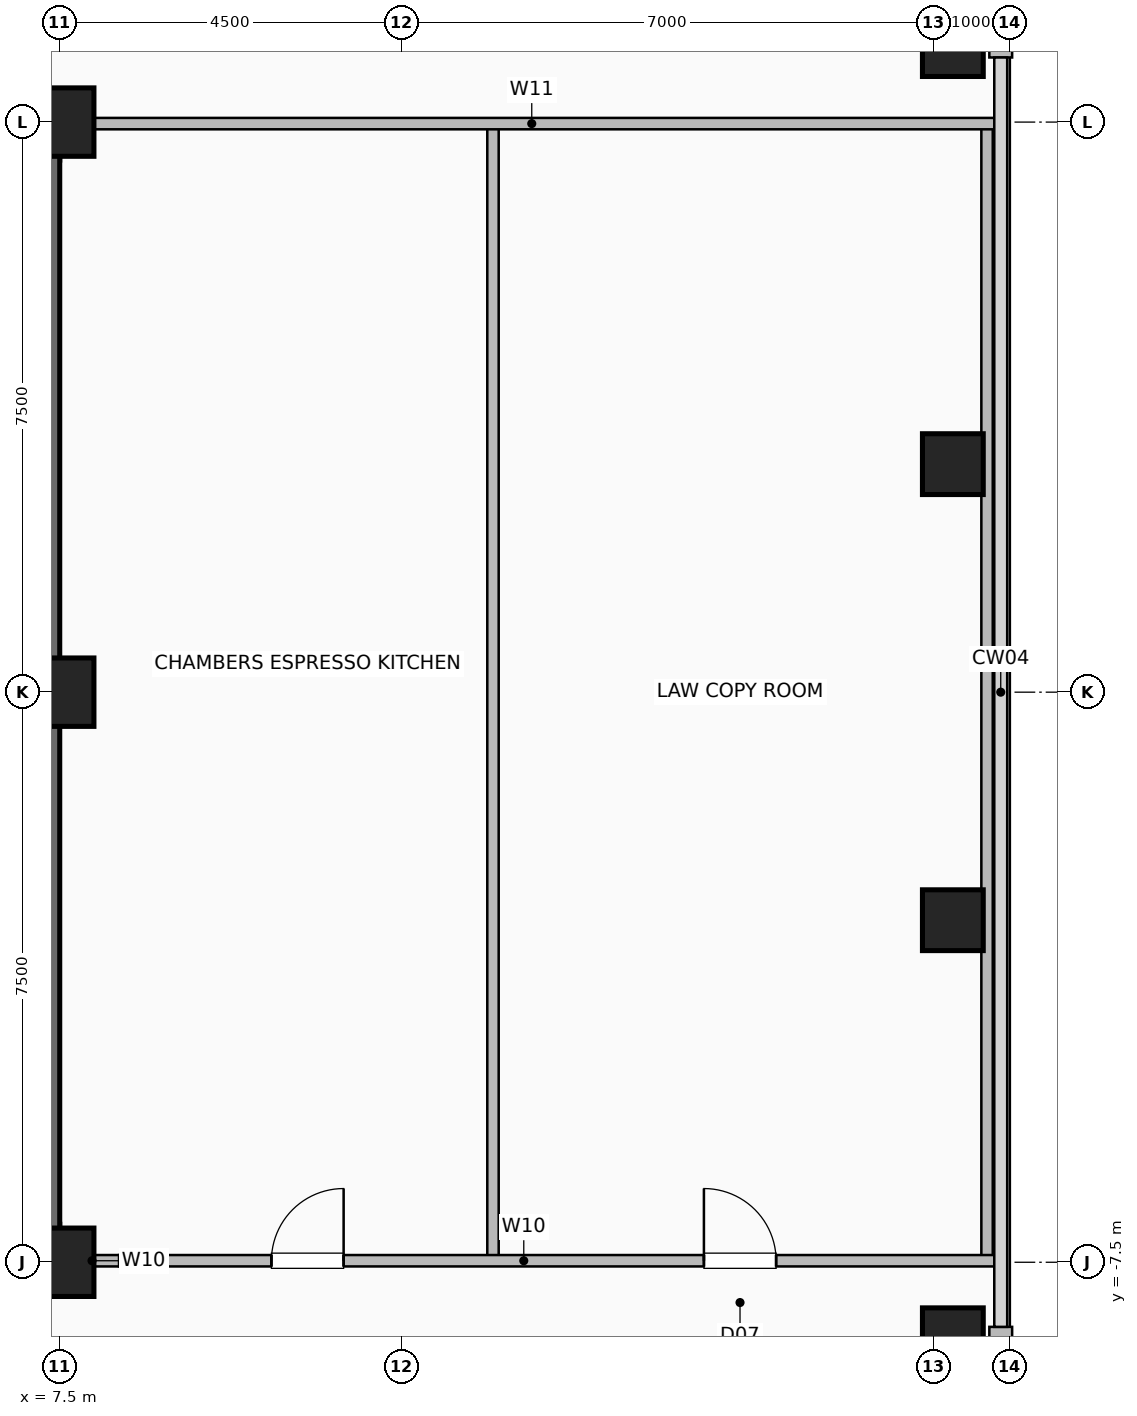
"""IFC4 building model, lengths in metres.
Left out: names, types, materials, properties, quantities, classifications, styles, units other than length and angle.
Written with IfcOpenShell. Run it as: python <this file> out.ifc"""

import sys

from ifc_helpers import new_model, si_unit, direction, frame, frame_2d, origin, origin_2d, place, context, subcontext, project, spatial, rectangle, hollow_rectangle, extrude, element, fill, save


model = new_model("IFC4")
c1 = context("Model", 3, precision=1e-05, world=origin(), true_north=direction((0.0, 1.0)))
c2 = subcontext(c1, "Body", "Model", "MODEL_VIEW")
j1 = project(units=[si_unit("LENGTHUNIT", "METRE"), si_unit("PLANEANGLEUNIT", "RADIAN")], contexts=[c1])
p1 = place(None, origin())
s1 = spatial("IfcSite", under=j1, at=p1, CompositionType="ELEMENT")
p2 = place(p1, origin())
s2 = spatial("IfcBuilding", under=s1, at=p2, CompositionType="ELEMENT")
p3 = place(p2, frame((0.0, 0.0, 169.8)))
s3 = spatial("IfcBuildingStorey", under=s2, at=p3, CompositionType="ELEMENT", Elevation=169.8)
for number, where, z_axis, x_axis in (
    (1, (7.5, -7.5, 0.0), (0.0, 0.0, 1.0), (1.0, 0.0, 0.0)),
    (2, (7.5, 0.0, 0.0), (0.0, 0.0, 1.0), (1.0, 0.0, 0.0)),
    (3, (7.5, 7.5, 0.0), (0.0, 0.0, 1.0), (1.0, 0.0, 0.0)),
):
    element("IfcColumn", number, at=place(p3, frame(where, z_axis=z_axis, x_axis=x_axis)), inside=s3, PredefinedType="COLUMN", context=c2, shape_type="SweptSolid", body=[
        extrude(hollow_rectangle(XDim=0.9, YDim=0.9, WallThickness=0.045, at=origin_2d()), origin(), (0.0, 0.0, 1.0), 3.6),
    ])
for number, where, z_axis, x_axis in (
    (4, (19.25, -8.5, 0.0), (0.0, 0.0, 1.0), (1.0, 0.0, 0.0)),
    (5, (19.25, -3.0, 0.0), (0.0, 0.0, 1.0), (1.0, 0.0, 0.0)),
    (6, (19.25, 3.0, 0.0), (0.0, 0.0, 1.0), (1.0, 0.0, 0.0)),
    (7, (19.25, 8.5, 0.0), (0.0, 0.0, 1.0), (1.0, 0.0, 0.0)),
):
    element("IfcColumn", number, at=place(p3, frame(where, z_axis=z_axis, x_axis=x_axis)), inside=s3, PredefinedType="COLUMN", context=c2, shape_type="SweptSolid", body=[
        extrude(hollow_rectangle(XDim=0.8, YDim=0.8, WallThickness=0.04, at=origin_2d()), origin(), (0.0, 0.0, 1.0), 3.6),
    ])
for number, where, z_axis, x_axis in (
    (8, (19.88, -13.15, 0.0), (0.0, 0.0, 1.0), (0.0, 1.0, 0.0)),
    (9, (19.88, 8.35, 0.0), (0.0, 0.0, 1.0), (0.0, 1.0, 0.0)),
):
    element("IfcWall", number, at=place(p3, frame(where, z_axis=z_axis, x_axis=x_axis)), inside=s3, PredefinedType="SOLIDWALL", context=c2, shape_type="SweptSolid", body=[
        extrude(rectangle(XDim=4.8, YDim=0.3, at=frame_2d((2.4, 0.0))), origin(), (0.0, 0.0, 1.0), 3.36),
    ])
p4 = place(p3, frame((-7.5, -7.25, 0.0), z_axis=(0.0, 0.0, 1.0), x_axis=(1.0, 0.0, 0.0)))
e10 = element("IfcWall", 10, at=p4, inside=s3, PredefinedType="SHEAR", context=c2, shape_type="SweptSolid", body=[
    extrude(rectangle(XDim=15.0, YDim=0.5, at=frame_2d((7.5, 0.0))), origin(), (0.0, 0.0, 1.0), 3.36),
])
p5 = place(p4, frame((1.55, 0.0, 0.0)))
e11 = element("IfcOpeningElement", 11, at=p5, cuts=e10, PredefinedType="OPENING", context=c2, shape_type="SweptSolid", body=[
    extrude(rectangle(XDim=1.05, YDim=2.08, at=frame_2d((0.525, 1.04))), frame((0.0, 0.26, 0.0), z_axis=(0.0, -1.0, 0.0), x_axis=(1.0, 0.0, 0.0)), (0.0, 0.0, 1.0), 0.52),
])
p6 = place(p4, frame((12.4, 0.0, 0.0)))
e12 = element("IfcOpeningElement", 12, at=p6, cuts=e10, PredefinedType="OPENING", context=c2, shape_type="SweptSolid", body=[
    extrude(rectangle(XDim=1.05, YDim=2.08, at=frame_2d((0.525, 1.04))), frame((0.0, 0.26, 0.0), z_axis=(0.0, -1.0, 0.0), x_axis=(1.0, 0.0, 0.0)), (0.0, 0.0, 1.0), 0.52),
])
p7 = place(p4, frame((5.2, 0.0, 0.0)))
e13 = element("IfcOpeningElement", 13, at=p7, cuts=e10, PredefinedType="OPENING", context=c2, shape_type="SweptSolid", body=[
    extrude(rectangle(XDim=1.0, YDim=2.08, at=frame_2d((0.5, 1.04))), frame((0.0, 0.26, 0.0), z_axis=(0.0, -1.0, 0.0), x_axis=(1.0, 0.0, 0.0)), (0.0, 0.0, 1.0), 0.52),
])
p8 = place(p4, frame((8.65, 0.0, 0.0)))
e14 = element("IfcOpeningElement", 14, at=p8, cuts=e10, PredefinedType="OPENING", context=c2, shape_type="SweptSolid", body=[
    extrude(rectangle(XDim=1.0, YDim=2.08, at=frame_2d((0.5, 1.04))), frame((0.0, 0.26, 0.0), z_axis=(0.0, -1.0, 0.0), x_axis=(1.0, 0.0, 0.0)), (0.0, 0.0, 1.0), 0.52),
])
for number, where, z_axis, x_axis in (
    (15, (-7.5, 7.25, 0.0), (0.0, 0.0, 1.0), (1.0, 0.0, 0.0)),
    (16, (7.25, -7.5, 0.0), (0.0, 0.0, 1.0), (0.0, 1.0, 0.0)),
):
    element("IfcWall", number, at=place(p3, frame(where, z_axis=z_axis, x_axis=x_axis)), inside=s3, PredefinedType="SHEAR", context=c2, shape_type="SweptSolid", body=[
        extrude(rectangle(XDim=15.0, YDim=0.5, at=frame_2d((7.5, 0.0))), origin(), (0.0, 0.0, 1.0), 3.36),
    ])
p9 = place(p3, frame((7.45, -7.48, 0.0), z_axis=(0.0, 0.0, 1.0), x_axis=(1.0, 0.0, 0.0)))
e17 = element("IfcWall", 17, at=p9, inside=s3, PredefinedType="PARTITIONING", context=c2, shape_type="SweptSolid", body=[
    extrude(rectangle(XDim=0.95, YDim=0.15, at=frame_2d((0.475, 0.0))), origin(), (0.0, 0.0, 1.0), 3.36),
])
for number, where, z_axis, x_axis in (
    (18, (13.2, -7.48, 0.0), (0.0, 0.0, 1.0), (0.0, 1.0, 0.0)),
    (19, (19.7, -7.48, 0.0), (0.0, 0.0, 1.0), (0.0, 1.0, 0.0)),
):
    element("IfcWall", number, at=place(p3, frame(where, z_axis=z_axis, x_axis=x_axis)), inside=s3, PredefinedType="PARTITIONING", context=c2, shape_type="SweptSolid", body=[
        extrude(rectangle(XDim=14.9, YDim=0.15, at=frame_2d((7.45, 0.0))), origin(), (0.0, 0.0, 1.0), 3.36),
    ])
p10 = place(p3, frame((8.28, -7.48, 0.0), z_axis=(0.0, 0.0, 1.0), x_axis=(1.0, 0.0, 0.0)))
e20 = element("IfcWall", 20, at=p10, inside=s3, PredefinedType="PARTITIONING", context=c2, shape_type="SweptSolid", body=[
    extrude(rectangle(XDim=11.54, YDim=0.15, at=frame_2d((5.77, 0.0))), origin(), (0.0, 0.0, 1.0), 3.36),
])
p11 = place(p10, frame((2.005, 0.0, 0.0)))
e21 = element("IfcOpeningElement", 21, at=p11, cuts=e20, PredefinedType="OPENING", context=c2, shape_type="SweptSolid", body=[
    extrude(rectangle(XDim=0.95, YDim=2.06, at=frame_2d((0.475, 1.03))), frame((0.0, 0.085, 0.0), z_axis=(0.0, -1.0, 0.0), x_axis=(1.0, 0.0, 0.0)), (0.0, 0.0, 1.0), 0.17),
])
p12 = place(p10, frame((7.695, 0.0, 0.0)))
e22 = element("IfcOpeningElement", 22, at=p12, cuts=e20, PredefinedType="OPENING", context=c2, shape_type="SweptSolid", body=[
    extrude(rectangle(XDim=0.95, YDim=2.06, at=frame_2d((0.475, 1.03))), frame((0.0, 0.085, 0.0), z_axis=(0.0, -1.0, 0.0), x_axis=(1.0, 0.0, 0.0)), (0.0, 0.0, 1.0), 0.17),
])
p13 = place(p3, frame((7.6, 7.48, 0.0), z_axis=(0.0, 0.0, 1.0), x_axis=(1.0, 0.0, 0.0)))
e23 = element("IfcWall", 23, at=p13, inside=s3, PredefinedType="PARTITIONING", context=c2, shape_type="SweptSolid", body=[
    extrude(rectangle(XDim=12.22, YDim=0.15, at=frame_2d((6.11, 0.0))), origin(), (0.0, 0.0, 1.0), 3.36),
])
p14 = place(p11, origin())
e24 = element("IfcDoor", 24, at=p14, inside=s3, OperationType="SINGLE_SWING_RIGHT", PredefinedType="DOOR", context=c2, shape_type="SweptSolid", body=[
    extrude(rectangle(XDim=0.95, YDim=2.06, at=frame_2d((0.475, 1.03))), frame((0.0, 0.025, 0.0), z_axis=(0.0, -1.0, 0.0), x_axis=(1.0, 0.0, 0.0)), (0.0, 0.0, 1.0), 0.05),
])
fill(e21, e24)
p15 = place(p12, origin())
e25 = element("IfcDoor", 25, at=p15, inside=s3, OperationType="SINGLE_SWING_LEFT", PredefinedType="DOOR", context=c2, shape_type="SweptSolid", body=[
    extrude(rectangle(XDim=0.95, YDim=2.06, at=frame_2d((0.475, 1.03))), frame((0.0, 0.025, 0.0), z_axis=(0.0, -1.0, 0.0), x_axis=(1.0, 0.0, 0.0)), (0.0, 0.0, 1.0), 0.05),
])
fill(e22, e25)
save(model, sys.argv[1])
